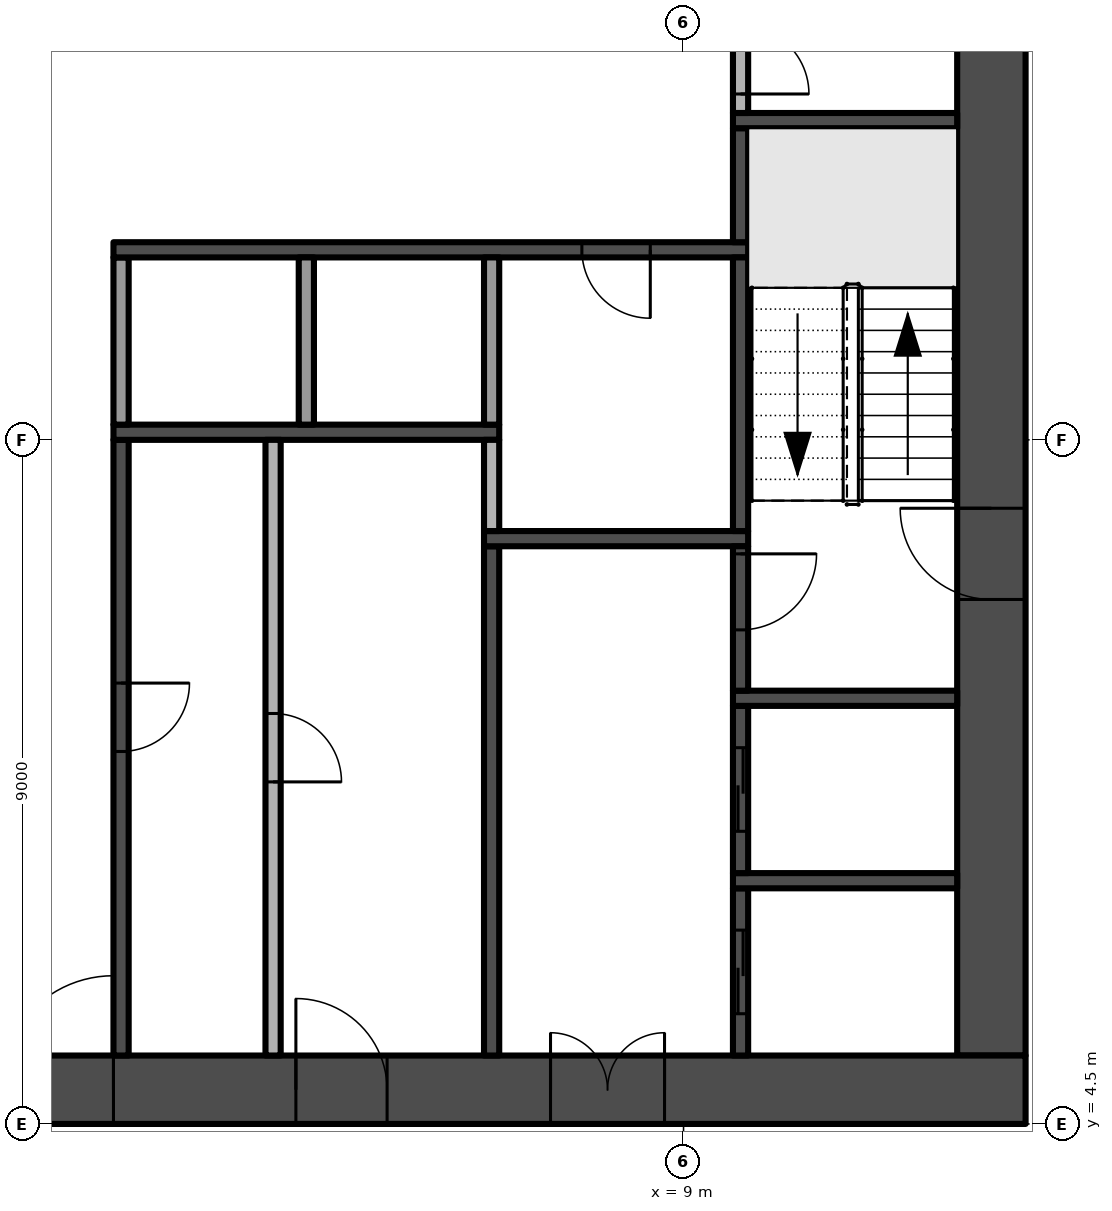
"""IFC4 building model, lengths in metres.
Left out: names, types, materials, properties, quantities, classifications, styles, units other than length and angle.
Written with IfcOpenShell. Run it as: python <this file> out.ifc"""

import sys

from ifc_helpers import new_model, si_unit, direction, frame, frame_2d, origin, place, context, subcontext, project, spatial, rectangle, extrude, element, fill, save


model = new_model("IFC4")
c1 = context("Model", 3, precision=1e-05, world=origin(), true_north=direction((0.0, 1.0)))
c2 = subcontext(c1, "Body", "Model", "MODEL_VIEW")
j1 = project(units=[si_unit("LENGTHUNIT", "METRE"), si_unit("PLANEANGLEUNIT", "RADIAN")], contexts=[c1])
p1 = place(None, origin())
s1 = spatial("IfcSite", under=j1, at=p1, CompositionType="ELEMENT")
p2 = place(p1, origin())
s2 = spatial("IfcBuilding", under=s1, at=p2, CompositionType="ELEMENT")
p3 = place(p2, frame((0.0, 0.0, 96.0)))
s3 = spatial("IfcBuildingStorey", under=s2, at=p3, CompositionType="ELEMENT", Elevation=96.0)
p4 = place(p3, frame((-13.5, 4.95, -0.3), z_axis=(0.0, 0.0, 1.0), x_axis=(1.0, 0.0, 0.0)))
e1 = element("IfcWall", 1, at=p4, inside=s3, PredefinedType="SHEAR", context=c2, shape_type="SweptSolid", body=[
    extrude(rectangle(XDim=27.0, YDim=0.9, at=frame_2d((13.5, 0.0))), origin(), (0.0, 0.0, 1.0), 3.8),
])
p5 = place(p4, frame((12.0, 0.0, 0.3)))
e2 = element("IfcOpeningElement", 2, at=p5, cuts=e1, PredefinedType="OPENING", context=c2, shape_type="SweptSolid", body=[
    extrude(rectangle(XDim=3.0, YDim=2.4, at=frame_2d((1.5, 1.2))), frame((0.0, 0.46, 0.0), z_axis=(0.0, -1.0, 0.0), x_axis=(1.0, 0.0, 0.0)), (0.0, 0.0, 1.0), 0.92),
])
p6 = place(p4, frame((4.9, 0.0, 0.3)))
e3 = element("IfcOpeningElement", 3, at=p6, cuts=e1, PredefinedType="OPENING", context=c2, shape_type="SweptSolid", body=[
    extrude(rectangle(XDim=1.2, YDim=2.2, at=frame_2d((0.6, 1.1))), frame((0.0, 0.46, 0.0), z_axis=(0.0, -1.0, 0.0), x_axis=(1.0, 0.0, 0.0)), (0.0, 0.0, 1.0), 0.92),
])
p7 = place(p4, frame((20.75, 0.0, 0.3)))
e4 = element("IfcOpeningElement", 4, at=p7, cuts=e1, PredefinedType="OPENING", context=c2, shape_type="SweptSolid", body=[
    extrude(rectangle(XDim=1.5, YDim=2.2, at=frame_2d((0.75, 1.1))), frame((0.0, 0.46, 0.0), z_axis=(0.0, -1.0, 0.0), x_axis=(1.0, 0.0, 0.0)), (0.0, 0.0, 1.0), 0.92),
])
p8 = place(p4, frame((17.4, 0.0, 0.3)))
e5 = element("IfcOpeningElement", 5, at=p8, cuts=e1, PredefinedType="OPENING", context=c2, shape_type="SweptSolid", body=[
    extrude(rectangle(XDim=1.2, YDim=2.2, at=frame_2d((0.6, 1.1))), frame((0.0, 0.46, 0.0), z_axis=(0.0, -1.0, 0.0), x_axis=(1.0, 0.0, 0.0)), (0.0, 0.0, 1.0), 0.92),
])
p9 = place(p3, frame((13.05, 5.4, -0.3), z_axis=(0.0, 0.0, 1.0), x_axis=(0.0, 1.0, 0.0)))
e6 = element("IfcWall", 6, at=p9, inside=s3, PredefinedType="SHEAR", context=c2, shape_type="SweptSolid", body=[
    extrude(rectangle(XDim=16.2, YDim=0.9, at=frame_2d((8.1, 0.0))), origin(), (0.0, 0.0, 1.0), 3.8),
])
p10 = place(p9, frame((6.0, 0.0, 0.3)))
e7 = element("IfcOpeningElement", 7, at=p10, cuts=e6, PredefinedType="OPENING", context=c2, shape_type="SweptSolid", body=[
    extrude(rectangle(XDim=1.2, YDim=2.2, at=frame_2d((0.6, 1.1))), frame((0.0, 0.46, 0.0), z_axis=(0.0, -1.0, 0.0), x_axis=(1.0, 0.0, 0.0)), (0.0, 0.0, 1.0), 0.92),
])
p11 = place(p3, frame((1.6, 13.5, 0.0), z_axis=(0.0, 0.0, 1.0), x_axis=(0.0, -1.0, 0.0)))
e8 = element("IfcWall", 8, at=p11, inside=s3, PredefinedType="SHEAR", context=c2, shape_type="SweptSolid", body=[
    extrude(rectangle(XDim=8.1, YDim=0.2, at=frame_2d((4.05, 0.0))), origin(), (0.0, 0.0, 1.0), 3.5),
])
p12 = place(p11, frame((3.2, 0.0, 0.0)))
e9 = element("IfcOpeningElement", 9, at=p12, cuts=e8, PredefinedType="OPENING", context=c2, shape_type="SweptSolid", body=[
    extrude(rectangle(XDim=0.9, YDim=2.1, at=frame_2d((0.45, 1.05))), frame((0.0, 0.11, 0.0), z_axis=(0.0, -1.0, 0.0), x_axis=(1.0, 0.0, 0.0)), (0.0, 0.0, 1.0), 0.22),
])
p13 = place(p3, frame((1.5, 13.6, 0.0), z_axis=(0.0, 0.0, 1.0), x_axis=(1.0, 0.0, 0.0)))
e10 = element("IfcWall", 10, at=p13, inside=s3, PredefinedType="SHEAR", context=c2, shape_type="SweptSolid", body=[
    extrude(rectangle(XDim=5.075, YDim=0.2, at=frame_2d((2.538, 0.0))), origin(), (0.0, 0.0, 1.0), 3.5),
])
p14 = place(p3, frame((1.6, 13.7, 0.0), z_axis=(0.0, 0.0, 1.0), x_axis=(0.0, 1.0, 0.0)))
e11 = element("IfcWall", 11, at=p14, inside=s3, PredefinedType="PARTITIONING", context=c2, shape_type="SweptSolid", body=[
    extrude(rectangle(XDim=2.2, YDim=0.2, at=frame_2d((1.1, 0.0))), origin(), (0.0, 0.0, 1.0), 3.5),
])
p15 = place(p3, frame((9.85, 16.0, 0.0), z_axis=(0.0, 0.0, 1.0), x_axis=(-1.0, 0.0, 0.0)))
e12 = element("IfcWall", 12, at=p15, inside=s3, PredefinedType="SHEAR", context=c2, shape_type="SweptSolid", body=[
    extrude(rectangle(XDim=8.35, YDim=0.2, at=frame_2d((4.175, 0.0))), origin(), (0.0, 0.0, 1.0), 3.5),
])
p16 = place(p15, frame((1.288, 0.0, 0.0)))
e13 = element("IfcOpeningElement", 13, at=p16, cuts=e12, PredefinedType="OPENING", context=c2, shape_type="SweptSolid", body=[
    extrude(rectangle(XDim=0.9, YDim=2.1, at=frame_2d((0.45, 1.05))), frame((0.0, 0.11, 0.0), z_axis=(0.0, -1.0, 0.0), x_axis=(1.0, 0.0, 0.0)), (0.0, 0.0, 1.0), 0.22),
])
p17 = place(p3, frame((3.6, 13.5, 0.0), z_axis=(0.0, 0.0, 1.0), x_axis=(0.0, -1.0, 0.0)))
e14 = element("IfcWall", 14, at=p17, inside=s3, PredefinedType="PARTITIONING", context=c2, shape_type="SweptSolid", body=[
    extrude(rectangle(XDim=8.1, YDim=0.2, at=frame_2d((4.05, 0.0))), origin(), (0.0, 0.0, 1.0), 3.5),
])
p18 = place(p17, frame((3.6, 0.0, 0.0)))
e15 = element("IfcOpeningElement", 15, at=p18, cuts=e14, PredefinedType="OPENING", context=c2, shape_type="SweptSolid", body=[
    extrude(rectangle(XDim=0.9, YDim=2.1, at=frame_2d((0.45, 1.05))), frame((0.0, 0.11, 0.0), z_axis=(0.0, -1.0, 0.0), x_axis=(1.0, 0.0, 0.0)), (0.0, 0.0, 1.0), 0.22),
])
p19 = place(p3, frame((4.037, 13.7, 0.0), z_axis=(0.0, 0.0, 1.0), x_axis=(0.0, 1.0, 0.0)))
e16 = element("IfcWall", 16, at=p19, inside=s3, PredefinedType="PARTITIONING", context=c2, shape_type="SweptSolid", body=[
    extrude(rectangle(XDim=2.2, YDim=0.2, at=frame_2d((1.1, 0.0))), origin(), (0.0, 0.0, 1.0), 3.5),
])
p20 = place(p3, frame((6.475, 5.4, 0.0), z_axis=(0.0, 0.0, 1.0), x_axis=(0.0, 1.0, 0.0)))
e17 = element("IfcWall", 17, at=p20, inside=s3, PredefinedType="SHEAR", context=c2, shape_type="SweptSolid", body=[
    extrude(rectangle(XDim=6.7, YDim=0.2, at=frame_2d((3.35, 0.0))), origin(), (0.0, 0.0, 1.0), 3.5),
])
p21 = place(p3, frame((6.375, 12.2, 0.0), z_axis=(0.0, 0.0, 1.0), x_axis=(1.0, 0.0, 0.0)))
e18 = element("IfcWall", 18, at=p21, inside=s3, PredefinedType="SHEAR", context=c2, shape_type="SweptSolid", body=[
    extrude(rectangle(XDim=3.475, YDim=0.2, at=frame_2d((1.738, 0.0))), origin(), (0.0, 0.0, 1.0), 3.5),
])
p22 = place(p3, frame((6.475, 12.3, 0.0), z_axis=(0.0, 0.0, 1.0), x_axis=(0.0, 1.0, 0.0)))
e19 = element("IfcWall", 19, at=p22, inside=s3, PredefinedType="PARTITIONING", context=c2, shape_type="SweptSolid", body=[
    extrude(rectangle(XDim=1.2, YDim=0.2, at=frame_2d((0.6, 0.0))), origin(), (0.0, 0.0, 1.0), 3.5),
])
p23 = place(p3, frame((6.475, 13.7, 0.0), z_axis=(0.0, 0.0, 1.0), x_axis=(0.0, 1.0, 0.0)))
e20 = element("IfcWall", 20, at=p23, inside=s3, PredefinedType="PARTITIONING", context=c2, shape_type="SweptSolid", body=[
    extrude(rectangle(XDim=2.2, YDim=0.2, at=frame_2d((1.1, 0.0))), origin(), (0.0, 0.0, 1.0), 3.5),
])
p24 = place(p3, frame((9.75, 5.4, 0.0), z_axis=(0.0, 0.0, 1.0), x_axis=(0.0, 1.0, 0.0)))
e21 = element("IfcWall", 21, at=p24, inside=s3, PredefinedType="SHEAR", context=c2, shape_type="SweptSolid", body=[
    extrude(rectangle(XDim=2.2, YDim=0.2, at=frame_2d((1.1, 0.0))), origin(), (0.0, 0.0, 1.0), 3.5),
])
p25 = place(p24, frame((0.55, 0.0, 0.0)))
e22 = element("IfcOpeningElement", 22, at=p25, cuts=e21, PredefinedType="OPENING", context=c2, shape_type="SweptSolid", body=[
    extrude(rectangle(XDim=1.1, YDim=2.1, at=frame_2d((0.55, 1.05))), frame((0.0, 0.11, 0.0), z_axis=(0.0, -1.0, 0.0), x_axis=(1.0, 0.0, 0.0)), (0.0, 0.0, 1.0), 0.22),
])
p26 = place(p3, frame((9.65, 7.7, 0.0), z_axis=(0.0, 0.0, 1.0), x_axis=(1.0, 0.0, 0.0)))
e23 = element("IfcWall", 23, at=p26, inside=s3, PredefinedType="SHEAR", context=c2, shape_type="SweptSolid", body=[
    extrude(rectangle(XDim=2.95, YDim=0.2, at=frame_2d((1.475, 0.0))), origin(), (0.0, 0.0, 1.0), 3.5),
])
p27 = place(p3, frame((9.75, 7.8, 0.0), z_axis=(0.0, 0.0, 1.0), x_axis=(0.0, 1.0, 0.0)))
e24 = element("IfcWall", 24, at=p27, inside=s3, PredefinedType="SHEAR", context=c2, shape_type="SweptSolid", body=[
    extrude(rectangle(XDim=2.2, YDim=0.2, at=frame_2d((1.1, 0.0))), origin(), (0.0, 0.0, 1.0), 3.5),
])
p28 = place(p27, frame((0.55, 0.0, 0.0)))
e25 = element("IfcOpeningElement", 25, at=p28, cuts=e24, PredefinedType="OPENING", context=c2, shape_type="SweptSolid", body=[
    extrude(rectangle(XDim=1.1, YDim=2.1, at=frame_2d((0.55, 1.05))), frame((0.0, 0.11, 0.0), z_axis=(0.0, -1.0, 0.0), x_axis=(1.0, 0.0, 0.0)), (0.0, 0.0, 1.0), 0.22),
])
p29 = place(p3, frame((9.65, 10.1, 0.0), z_axis=(0.0, 0.0, 1.0), x_axis=(1.0, 0.0, 0.0)))
e26 = element("IfcWall", 26, at=p29, inside=s3, PredefinedType="SHEAR", context=c2, shape_type="SweptSolid", body=[
    extrude(rectangle(XDim=2.95, YDim=0.2, at=frame_2d((1.475, 0.0))), origin(), (0.0, 0.0, 1.0), 3.5),
])
p30 = place(p3, frame((9.75, 12.1, 0.0), z_axis=(0.0, 0.0, 1.0), x_axis=(0.0, -1.0, 0.0)))
e27 = element("IfcWall", 27, at=p30, inside=s3, PredefinedType="SHEAR", context=c2, shape_type="SweptSolid", body=[
    extrude(rectangle(XDim=1.9, YDim=0.2, at=frame_2d((0.95, 0.0))), origin(), (0.0, 0.0, 1.0), 3.5),
])
p31 = place(p30, frame((0.1, 0.0, 0.0)))
e28 = element("IfcOpeningElement", 28, at=p31, cuts=e27, PredefinedType="OPENING", context=c2, shape_type="SweptSolid", body=[
    extrude(rectangle(XDim=1.0, YDim=2.2, at=frame_2d((0.5, 1.1))), frame((0.0, 0.11, 0.0), z_axis=(0.0, -1.0, 0.0), x_axis=(1.0, 0.0, 0.0)), (0.0, 0.0, 1.0), 0.22),
])
p32 = place(p3, frame((9.75, 12.3, 0.0), z_axis=(0.0, 0.0, 1.0), x_axis=(0.0, 1.0, 0.0)))
e29 = element("IfcWall", 29, at=p32, inside=s3, PredefinedType="SHEAR", context=c2, shape_type="SweptSolid", body=[
    extrude(rectangle(XDim=3.6, YDim=0.2, at=frame_2d((1.8, 0.0))), origin(), (0.0, 0.0, 1.0), 3.5),
])
p33 = place(p3, frame((9.75, 16.1, 0.0), z_axis=(0.0, 0.0, 1.0), x_axis=(0.0, 1.0, 0.0)))
e30 = element("IfcWall", 30, at=p33, inside=s3, PredefinedType="SHEAR", context=c2, shape_type="SweptSolid", body=[
    extrude(rectangle(XDim=1.5, YDim=0.2, at=frame_2d((0.75, 0.0))), origin(), (0.0, 0.0, 1.0), 3.5),
])
p34 = place(p3, frame((9.65, 17.7, 0.0), z_axis=(0.0, 0.0, 1.0), x_axis=(1.0, 0.0, 0.0)))
e31 = element("IfcWall", 31, at=p34, inside=s3, PredefinedType="SHEAR", context=c2, shape_type="SweptSolid", body=[
    extrude(rectangle(XDim=2.95, YDim=0.2, at=frame_2d((1.475, 0.0))), origin(), (0.0, 0.0, 1.0), 3.5),
])
p35 = place(p3, frame((9.75, 19.2, 0.0), z_axis=(0.0, 0.0, 1.0), x_axis=(0.0, -1.0, 0.0)))
e32 = element("IfcWall", 32, at=p35, inside=s3, PredefinedType="PARTITIONING", context=c2, shape_type="SweptSolid", body=[
    extrude(rectangle(XDim=1.4, YDim=0.2, at=frame_2d((0.7, 0.0))), origin(), (0.0, 0.0, 1.0), 3.5),
])
p36 = place(p35, frame((0.25, 0.0, 0.0)))
e33 = element("IfcOpeningElement", 33, at=p36, cuts=e32, PredefinedType="OPENING", context=c2, shape_type="SweptSolid", body=[
    extrude(rectangle(XDim=0.9, YDim=2.1, at=frame_2d((0.45, 1.05))), frame((0.0, 0.11, 0.0), z_axis=(0.0, -1.0, 0.0), x_axis=(1.0, 0.0, 0.0)), (0.0, 0.0, 1.0), 0.22),
])
p37 = place(p5, frame((3.0, 0.0, 0.0), z_axis=(0.0, 0.0, 1.0), x_axis=(-1.0, 0.0, 0.0)))
e34 = element("IfcDoor", 34, at=p37, inside=s3, OperationType="DOUBLE_DOOR_SINGLE_SWING", PredefinedType="DOOR", context=c2, shape_type="SweptSolid", body=[
    extrude(rectangle(XDim=3.0, YDim=2.4, at=frame_2d((1.5, 1.2))), frame((0.0, 0.025, 0.0), z_axis=(0.0, -1.0, 0.0), x_axis=(1.0, 0.0, 0.0)), (0.0, 0.0, 1.0), 0.05),
])
fill(e2, e34)
p38 = place(p10, frame((1.2, 0.0, 0.0), z_axis=(0.0, 0.0, 1.0), x_axis=(-1.0, 0.0, 0.0)))
e35 = element("IfcDoor", 35, at=p38, inside=s3, OperationType="SINGLE_SWING_LEFT", PredefinedType="DOOR", context=c2, shape_type="SweptSolid", body=[
    extrude(rectangle(XDim=1.2, YDim=2.2, at=frame_2d((0.6, 1.1))), frame((0.0, 0.025, 0.0), z_axis=(0.0, -1.0, 0.0), x_axis=(1.0, 0.0, 0.0)), (0.0, 0.0, 1.0), 0.05),
])
fill(e7, e35)
p39 = place(p7, frame((1.5, 0.0, 0.0), z_axis=(0.0, 0.0, 1.0), x_axis=(-1.0, 0.0, 0.0)))
e36 = element("IfcDoor", 36, at=p39, inside=s3, OperationType="DOUBLE_DOOR_SINGLE_SWING", PredefinedType="DOOR", context=c2, shape_type="SweptSolid", body=[
    extrude(rectangle(XDim=1.5, YDim=2.2, at=frame_2d((0.75, 1.1))), frame((0.0, 0.025, 0.0), z_axis=(0.0, -1.0, 0.0), x_axis=(1.0, 0.0, 0.0)), (0.0, 0.0, 1.0), 0.05),
])
fill(e4, e36)
p40 = place(p8, frame((1.2, 0.0, 0.0), z_axis=(0.0, 0.0, 1.0), x_axis=(-1.0, 0.0, 0.0)))
e37 = element("IfcDoor", 37, at=p40, inside=s3, OperationType="SINGLE_SWING_RIGHT", PredefinedType="DOOR", context=c2, shape_type="SweptSolid", body=[
    extrude(rectangle(XDim=1.2, YDim=2.2, at=frame_2d((0.6, 1.1))), frame((0.0, 0.025, 0.0), z_axis=(0.0, -1.0, 0.0), x_axis=(1.0, 0.0, 0.0)), (0.0, 0.0, 1.0), 0.05),
])
fill(e5, e37)
p41 = place(p31, origin())
e38 = element("IfcDoor", 38, at=p41, inside=s3, OperationType="SINGLE_SWING_LEFT", PredefinedType="DOOR", context=c2, shape_type="SweptSolid", body=[
    extrude(rectangle(XDim=1.0, YDim=2.2, at=frame_2d((0.5, 1.1))), frame((0.0, 0.025, 0.0), z_axis=(0.0, -1.0, 0.0), x_axis=(1.0, 0.0, 0.0)), (0.0, 0.0, 1.0), 0.05),
])
fill(e28, e38)
p42 = place(p25, origin())
e39 = element("IfcDoor", 39, at=p42, inside=s3, OperationType="SLIDING_TO_RIGHT", PredefinedType="DOOR", context=c2, shape_type="SweptSolid", body=[
    extrude(rectangle(XDim=1.1, YDim=2.1, at=frame_2d((0.55, 1.05))), frame((0.0, 0.025, 0.0), z_axis=(0.0, -1.0, 0.0), x_axis=(1.0, 0.0, 0.0)), (0.0, 0.0, 1.0), 0.05),
])
fill(e22, e39)
p43 = place(p28, origin())
e40 = element("IfcDoor", 40, at=p43, inside=s3, OperationType="SLIDING_TO_RIGHT", PredefinedType="DOOR", context=c2, shape_type="SweptSolid", body=[
    extrude(rectangle(XDim=1.1, YDim=2.1, at=frame_2d((0.55, 1.05))), frame((0.0, 0.025, 0.0), z_axis=(0.0, -1.0, 0.0), x_axis=(1.0, 0.0, 0.0)), (0.0, 0.0, 1.0), 0.05),
])
fill(e25, e40)
p44 = place(p12, origin())
e41 = element("IfcDoor", 41, at=p44, inside=s3, OperationType="SINGLE_SWING_LEFT", PredefinedType="DOOR", context=c2, shape_type="SweptSolid", body=[
    extrude(rectangle(XDim=0.9, YDim=2.1, at=frame_2d((0.45, 1.05))), frame((0.0, 0.025, 0.0), z_axis=(0.0, -1.0, 0.0), x_axis=(1.0, 0.0, 0.0)), (0.0, 0.0, 1.0), 0.05),
])
fill(e9, e41)
p45 = place(p16, origin())
e42 = element("IfcDoor", 42, at=p45, inside=s3, OperationType="SINGLE_SWING_LEFT", PredefinedType="DOOR", context=c2, shape_type="SweptSolid", body=[
    extrude(rectangle(XDim=0.9, YDim=2.1, at=frame_2d((0.45, 1.05))), frame((0.0, 0.025, 0.0), z_axis=(0.0, -1.0, 0.0), x_axis=(1.0, 0.0, 0.0)), (0.0, 0.0, 1.0), 0.05),
])
fill(e13, e42)
p46 = place(p36, origin())
e43 = element("IfcDoor", 43, at=p46, inside=s3, OperationType="SINGLE_SWING_RIGHT", PredefinedType="DOOR", context=c2, shape_type="SweptSolid", body=[
    extrude(rectangle(XDim=0.9, YDim=2.1, at=frame_2d((0.45, 1.05))), frame((0.0, 0.025, 0.0), z_axis=(0.0, -1.0, 0.0), x_axis=(1.0, 0.0, 0.0)), (0.0, 0.0, 1.0), 0.05),
])
fill(e33, e43)
p47 = place(p18, origin())
e44 = element("IfcDoor", 44, at=p47, inside=s3, OperationType="SINGLE_SWING_RIGHT", PredefinedType="DOOR", context=c2, shape_type="SweptSolid", body=[
    extrude(rectangle(XDim=0.9, YDim=2.1, at=frame_2d((0.45, 1.05))), frame((0.0, 0.025, 0.0), z_axis=(0.0, -1.0, 0.0), x_axis=(1.0, 0.0, 0.0)), (0.0, 0.0, 1.0), 0.05),
])
fill(e15, e44)
save(model, sys.argv[1])
